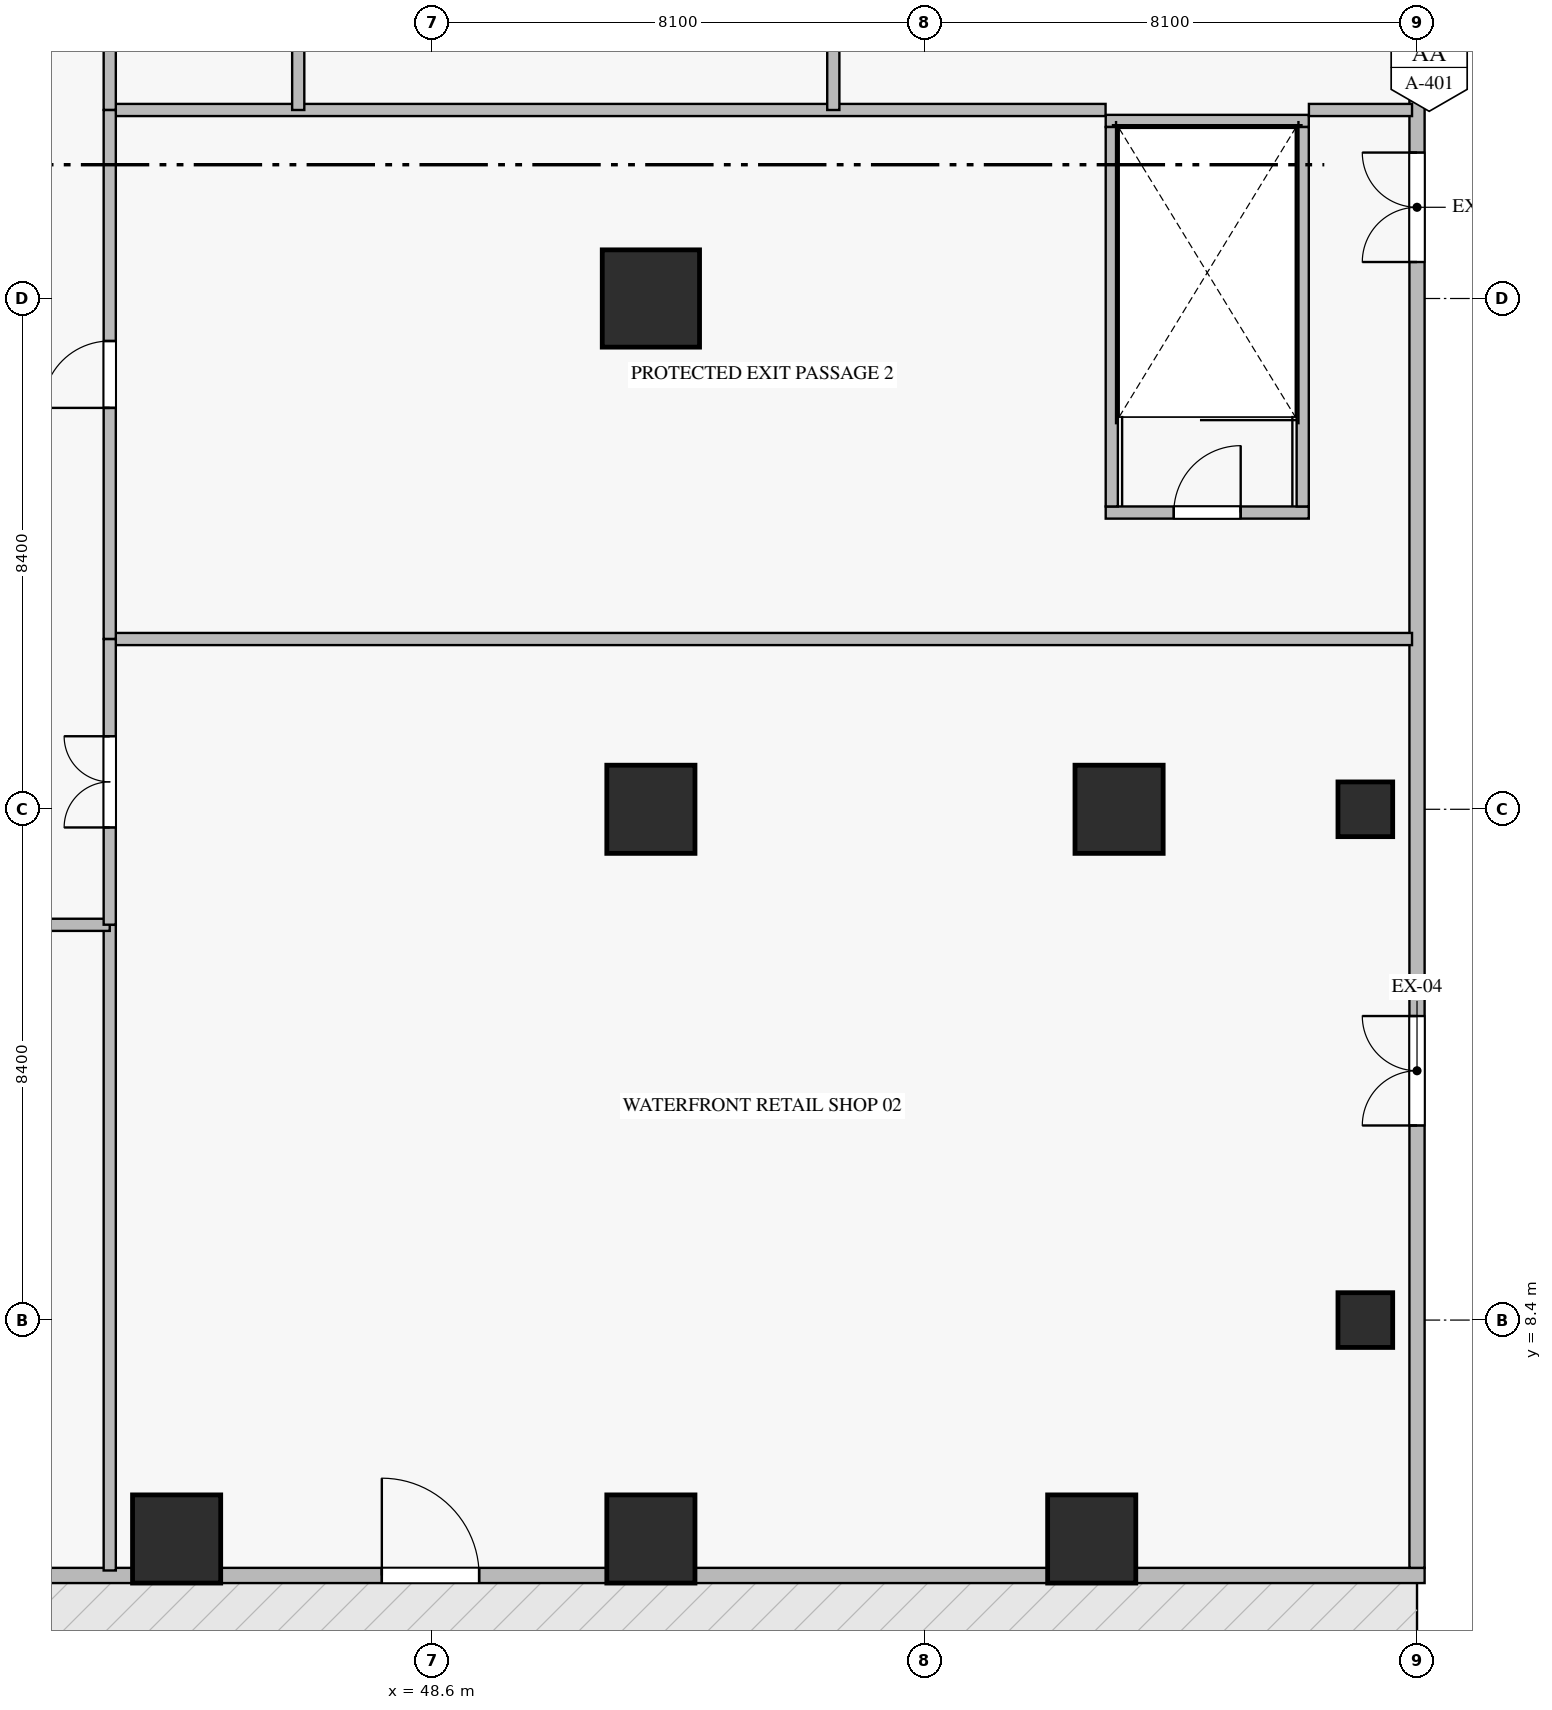
"""IFC4 building model, lengths in metres.
Left out: names, types, materials, properties, quantities, classifications, styles, units other than length and angle.
Written with IfcOpenShell. Run it as: python <this file> out.ifc"""

import sys

from ifc_helpers import new_model, si_unit, direction, frame, frame_2d, origin, origin_2d, place, context, subcontext, project, spatial, rectangle, extrude, source, transform, mapped, element, fill, save


model = new_model("IFC4")
c1 = context("Model", 3, precision=1e-05, world=origin(), true_north=direction((0.0, 1.0)))
c2 = subcontext(c1, "Body", "Model", "MODEL_VIEW")
j1 = project(units=[si_unit("LENGTHUNIT", "METRE"), si_unit("PLANEANGLEUNIT", "RADIAN")], contexts=[c1])
p1 = place(None, origin())
s1 = spatial("IfcSite", under=j1, at=p1, CompositionType="ELEMENT")
p2 = place(p1, origin())
s2 = spatial("IfcBuilding", under=s1, at=p2, CompositionType="ELEMENT")
p3 = place(p2, origin())
s3 = spatial("IfcBuildingStorey", under=s2, at=p3, CompositionType="ELEMENT", Elevation=0.0)
m1 = source(origin(), c2, "Body", "SweptSolid", [
    extrude(rectangle(XDim=0.9, YDim=0.9, at=origin_2d()), origin(), (0.0, 0.0, 1.0), 5.5),
])
for number, where, z_axis, x_axis in (
    (1, (63.95, 8.4, -0.38), (0.0, 0.0, 1.0), (1.0, 0.0, 0.0)),
    (2, (63.95, 16.8, -0.38), (0.0, 0.0, 1.0), (1.0, 0.0, 0.0)),
):
    element("IfcColumn", number, at=place(p3, frame(where, z_axis=z_axis, x_axis=x_axis)), inside=s3, PredefinedType="COLUMN", context=c2, shape_type="MappedRepresentation", body=[
        mapped(m1, transform((0.0, 0.0, 0.0), scale=1.0)),
    ])
m2 = source(origin(), c2, "Body", "SweptSolid", [
    extrude(rectangle(XDim=1.45, YDim=1.45, at=origin_2d()), origin(), (0.0, 0.0, 1.0), 5.5),
])
for number, where, z_axis, x_axis in (
    (3, (44.4, 4.8, -0.38), (0.0, 0.0, 1.0), (1.0, 0.0, 0.0)),
    (4, (52.2, 4.8, -0.38), (0.0, 0.0, 1.0), (1.0, 0.0, 0.0)),
    (5, (52.2, 16.8, -0.38), (0.0, 0.0, 1.0), (1.0, 0.0, 0.0)),
):
    element("IfcColumn", number, at=place(p3, frame(where, z_axis=z_axis, x_axis=x_axis)), inside=s3, PredefinedType="COLUMN", context=c2, shape_type="MappedRepresentation", body=[
        mapped(m2, transform((0.0, 0.0, 0.0), scale=1.0)),
    ])
m3 = source(origin(), c2, "Body", "SweptSolid", [
    extrude(rectangle(XDim=1.6, YDim=1.6, at=origin_2d()), origin(), (0.0, 0.0, 1.0), 5.5),
])
p4 = place(p3, frame((52.2, 25.2, -0.38), z_axis=(0.0, 0.0, 1.0), x_axis=(1.0, 0.0, 0.0)))
e6 = element("IfcColumn", 6, at=p4, inside=s3, PredefinedType="COLUMN", context=c2, shape_type="MappedRepresentation", body=[
    mapped(m3, transform((0.0, 0.0, 0.0), scale=1.0)),
])
for number, where, z_axis, x_axis in (
    (7, (59.9, 16.8, -0.38), (0.0, 0.0, 1.0), (1.0, 0.0, 0.0)),
    (8, (59.45, 4.8, -0.38), (0.0, 0.0, 1.0), (1.0, 0.0, 0.0)),
):
    element("IfcColumn", number, at=place(p3, frame(where, z_axis=z_axis, x_axis=x_axis)), inside=s3, PredefinedType="COLUMN", context=c2, shape_type="MappedRepresentation", body=[
        mapped(m2, transform((0.0, 0.0, 0.0), scale=1.0)),
    ])
p5 = place(p3, frame((40.375, 4.2, 0.0), z_axis=(0.0, 0.0, 1.0), x_axis=(1.0, 0.0, 0.0)))
e9 = element("IfcWall", 9, at=p5, inside=s3, PredefinedType="ELEMENTEDWALL", context=c2, shape_type="SweptSolid", body=[
    extrude(rectangle(XDim=24.55, YDim=0.25, at=frame_2d((12.275, 0.0))), origin(), (0.0, 0.0, 1.0), 5.105),
])
p6 = place(p5, frame((7.4, 0.0, 0.0)))
e10 = element("IfcOpeningElement", 10, at=p6, cuts=e9, PredefinedType="OPENING", context=c2, shape_type="SweptSolid", body=[
    extrude(rectangle(XDim=1.6, YDim=2.4, at=frame_2d((0.8, 1.2))), frame((0.0, 0.135, 0.0), z_axis=(0.0, -1.0, 0.0), x_axis=(1.0, 0.0, 0.0)), (0.0, 0.0, 1.0), 0.27),
])
p7 = place(p3, frame((64.8, 4.325, 0.0), z_axis=(0.0, 0.0, 1.0), x_axis=(0.0, 1.0, 0.0)))
e11 = element("IfcWall", 11, at=p7, inside=s3, PredefinedType="ELEMENTEDWALL", context=c2, shape_type="SweptSolid", body=[
    extrude(rectangle(XDim=41.75, YDim=0.25, at=frame_2d((20.875, 0.0))), origin(), (0.0, 0.0, 1.0), 5.105),
])
p8 = place(p7, frame((21.475, 0.0, 0.0)))
e12 = element("IfcOpeningElement", 12, at=p8, cuts=e11, PredefinedType="OPENING", context=c2, shape_type="SweptSolid", body=[
    extrude(rectangle(XDim=1.8, YDim=2.3, at=frame_2d((0.9, 1.15))), frame((0.0, 0.135, 0.0), z_axis=(0.0, -1.0, 0.0), x_axis=(1.0, 0.0, 0.0)), (0.0, 0.0, 1.0), 0.27),
])
p9 = place(p7, frame((7.275, 0.0, 0.0)))
e13 = element("IfcOpeningElement", 13, at=p9, cuts=e11, PredefinedType="OPENING", context=c2, shape_type="SweptSolid", body=[
    extrude(rectangle(XDim=1.8, YDim=2.3, at=frame_2d((0.9, 1.15))), frame((0.0, 0.135, 0.0), z_axis=(0.0, -1.0, 0.0), x_axis=(1.0, 0.0, 0.0)), (0.0, 0.0, 1.0), 0.27),
])
p10 = place(p3, frame((59.68, 21.68, 0.0), z_axis=(0.0, 0.0, 1.0), x_axis=(1.0, 0.0, 0.0)))
e14 = element("IfcWall", 14, at=p10, inside=s3, PredefinedType="STANDARD", context=c2, shape_type="SweptSolid", body=[
    extrude(rectangle(XDim=3.34, YDim=0.2, at=frame_2d((1.67, 0.0))), origin(), (0.0, 0.0, 1.0), 5.12),
])
p11 = place(p10, frame((1.12, 0.0, 0.0)))
e15 = element("IfcOpeningElement", 15, at=p11, cuts=e14, PredefinedType="OPENING", context=c2, shape_type="SweptSolid", body=[
    extrude(rectangle(XDim=1.1, YDim=2.15, at=frame_2d((0.55, 1.075))), frame((0.0, 0.11, 0.0), z_axis=(0.0, -1.0, 0.0), x_axis=(1.0, 0.0, 0.0)), (0.0, 0.0, 1.0), 0.22),
])
p12 = place(p3, frame((59.68, 28.12, 0.0), z_axis=(0.0, 0.0, 1.0), x_axis=(1.0, 0.0, 0.0)))
e16 = element("IfcWall", 16, at=p12, inside=s3, PredefinedType="STANDARD", context=c2, shape_type="SweptSolid", body=[
    extrude(rectangle(XDim=3.34, YDim=0.2, at=frame_2d((1.67, 0.0))), origin(), (0.0, 0.0, 1.0), 5.12),
])
for number, where, z_axis, x_axis in (
    (17, (59.78, 21.78, 0.0), (0.0, 0.0, 1.0), (0.0, 1.0, 0.0)),
    (18, (62.92, 21.78, 0.0), (0.0, 0.0, 1.0), (0.0, 1.0, 0.0)),
):
    element("IfcWall", number, at=place(p3, frame(where, z_axis=z_axis, x_axis=x_axis)), inside=s3, PredefinedType="STANDARD", context=c2, shape_type="SweptSolid", body=[
        extrude(rectangle(XDim=6.24, YDim=0.2, at=frame_2d((3.12, 0.0))), origin(), (0.0, 0.0, 1.0), 5.12),
    ])
p13 = place(p3, frame((43.3, 4.282, 0.0), z_axis=(0.0, 0.0, 1.0), x_axis=(0.0, 1.0, 0.0)))
e19 = element("IfcWall", 19, at=p13, inside=s3, PredefinedType="STANDARD", context=c2, shape_type="SweptSolid", body=[
    extrude(rectangle(XDim=10.618, YDim=0.2, at=frame_2d((5.309, 0.0))), origin(), (0.0, 0.0, 1.0), 5.12),
])
p14 = place(p3, frame((43.3, 19.6, 0.0), z_axis=(0.0, 0.0, 1.0), x_axis=(1.0, 0.0, 0.0)))
e20 = element("IfcWall", 20, at=p14, inside=s3, PredefinedType="STANDARD", context=c2, shape_type="SweptSolid", body=[
    extrude(rectangle(XDim=21.418, YDim=0.2, at=frame_2d((10.709, 0.0))), origin(), (0.0, 0.0, 1.0), 5.12),
])
p15 = place(p3, frame((43.3, 28.3, 0.0), z_axis=(0.0, 0.0, 1.0), x_axis=(1.0, 0.0, 0.0)))
e21 = element("IfcWall", 21, at=p15, inside=s3, PredefinedType="STANDARD", context=c2, shape_type="SweptSolid", body=[
    extrude(rectangle(XDim=16.378, YDim=0.2, at=frame_2d((8.189, 0.0))), origin(), (0.0, 0.0, 1.0), 5.12),
])
p16 = place(p3, frame((63.022, 28.3, 0.0), z_axis=(0.0, 0.0, 1.0), x_axis=(1.0, 0.0, 0.0)))
e22 = element("IfcWall", 22, at=p16, inside=s3, PredefinedType="STANDARD", context=c2, shape_type="SweptSolid", body=[
    extrude(rectangle(XDim=1.696, YDim=0.2, at=frame_2d((0.848, 0.0))), origin(), (0.0, 0.0, 1.0), 5.12),
])
p17 = place(p3, frame((21.5, 14.9, 0.0), z_axis=(0.0, 0.0, 1.0), x_axis=(1.0, 0.0, 0.0)))
e23 = element("IfcWall", 23, at=p17, inside=s3, PredefinedType="STANDARD", context=c2, shape_type="SweptSolid", body=[
    extrude(rectangle(XDim=21.8, YDim=0.2, at=frame_2d((10.9, 0.0))), origin(), (0.0, 0.0, 1.0), 5.12),
])
p18 = place(p17, frame((10.1, 0.0, 0.0)))
e24 = element("IfcOpeningElement", 24, at=p18, cuts=e23, PredefinedType="OPENING", context=c2, shape_type="SweptSolid", body=[
    extrude(rectangle(XDim=1.6, YDim=2.3, at=frame_2d((0.8, 1.15))), frame((0.0, 0.11, 0.0), z_axis=(0.0, -1.0, 0.0), x_axis=(1.0, 0.0, 0.0)), (0.0, 0.0, 1.0), 0.22),
])
p19 = place(p3, frame((43.3, 14.902, 0.0), z_axis=(0.0, 0.0, 1.0), x_axis=(0.0, 1.0, 0.0)))
e25 = element("IfcWall", 25, at=p19, inside=s3, PredefinedType="STANDARD", context=c2, shape_type="SweptSolid", body=[
    extrude(rectangle(XDim=4.698, YDim=0.2, at=frame_2d((2.349, 0.0))), origin(), (0.0, 0.0, 1.0), 5.12),
])
p20 = place(p19, frame((1.599, 0.0, 0.0)))
e26 = element("IfcOpeningElement", 26, at=p20, cuts=e25, PredefinedType="OPENING", context=c2, shape_type="SweptSolid", body=[
    extrude(rectangle(XDim=1.5, YDim=2.25, at=frame_2d((0.75, 1.125))), frame((0.0, 0.11, 0.0), z_axis=(0.0, -1.0, 0.0), x_axis=(1.0, 0.0, 0.0)), (0.0, 0.0, 1.0), 0.22),
])
p21 = place(p3, frame((43.3, 19.602, 0.0), z_axis=(0.0, 0.0, 1.0), x_axis=(0.0, 1.0, 0.0)))
e27 = element("IfcWall", 27, at=p21, inside=s3, PredefinedType="STANDARD", context=c2, shape_type="SweptSolid", body=[
    extrude(rectangle(XDim=8.698, YDim=0.2, at=frame_2d((4.349, 0.0))), origin(), (0.0, 0.0, 1.0), 5.12),
])
p22 = place(p21, frame((3.799, 0.0, 0.0)))
e28 = element("IfcOpeningElement", 28, at=p22, cuts=e27, PredefinedType="OPENING", context=c2, shape_type="SweptSolid", body=[
    extrude(rectangle(XDim=1.1, YDim=2.15, at=frame_2d((0.55, 1.075))), frame((0.0, 0.11, 0.0), z_axis=(0.0, -1.0, 0.0), x_axis=(1.0, 0.0, 0.0)), (0.0, 0.0, 1.0), 0.22),
])
p23 = place(p3, frame((43.3, 28.302, 0.0), z_axis=(0.0, 0.0, 1.0), x_axis=(0.0, 1.0, 0.0)))
e29 = element("IfcWall", 29, at=p23, inside=s3, PredefinedType="STANDARD", context=c2, shape_type="SweptSolid", body=[
    extrude(rectangle(XDim=7.198, YDim=0.2, at=frame_2d((3.599, 0.0))), origin(), (0.0, 0.0, 1.0), 5.12),
])
p24 = place(p23, frame((2.899, 0.0, 0.0)))
e30 = element("IfcOpeningElement", 30, at=p24, cuts=e29, PredefinedType="OPENING", context=c2, shape_type="SweptSolid", body=[
    extrude(rectangle(XDim=1.4, YDim=2.2, at=frame_2d((0.7, 1.1))), frame((0.0, 0.11, 0.0), z_axis=(0.0, -1.0, 0.0), x_axis=(1.0, 0.0, 0.0)), (0.0, 0.0, 1.0), 0.22),
])
p25 = place(p3, frame((46.4, 28.3, 0.0), z_axis=(0.0, 0.0, 1.0), x_axis=(0.0, 1.0, 0.0)))
e31 = element("IfcWall", 31, at=p25, inside=s3, PredefinedType="STANDARD", context=c2, shape_type="SweptSolid", body=[
    extrude(rectangle(XDim=17.9, YDim=0.2, at=frame_2d((8.95, 0.0))), origin(), (0.0, 0.0, 1.0), 5.12),
])
p26 = place(p25, frame((3.696, 0.0, 0.0)))
e32 = element("IfcOpeningElement", 32, at=p26, cuts=e31, PredefinedType="OPENING", context=c2, shape_type="SweptSolid", body=[
    extrude(rectangle(XDim=1.1, YDim=2.15, at=frame_2d((0.55, 1.075))), frame((0.0, 0.11, 0.0), z_axis=(0.0, -1.0, 0.0), x_axis=(1.0, 0.0, 0.0)), (0.0, 0.0, 1.0), 0.22),
])
p27 = place(p3, frame((55.2, 28.3, 0.0), z_axis=(0.0, 0.0, 1.0), x_axis=(0.0, 1.0, 0.0)))
e33 = element("IfcWall", 33, at=p27, inside=s3, PredefinedType="STANDARD", context=c2, shape_type="SweptSolid", body=[
    extrude(rectangle(XDim=19.618, YDim=0.2, at=frame_2d((9.809, 0.0))), origin(), (0.0, 0.0, 1.0), 5.12),
])
p28 = place(p27, frame((6.376, 0.0, 0.0)))
e34 = element("IfcOpeningElement", 34, at=p28, cuts=e33, PredefinedType="OPENING", context=c2, shape_type="SweptSolid", body=[
    extrude(rectangle(XDim=1.4, YDim=2.2, at=frame_2d((0.7, 1.1))), frame((0.0, 0.11, 0.0), z_axis=(0.0, -1.0, 0.0), x_axis=(1.0, 0.0, 0.0)), (0.0, 0.0, 1.0), 0.22),
])
m4 = source(origin(), c2, "Body", "SweptSolid", [
    extrude(rectangle(XDim=1.6, YDim=2.4, at=frame_2d((0.8, 1.2))), frame((0.0, 0.025, 0.0), z_axis=(0.0, -1.0, 0.0), x_axis=(1.0, 0.0, 0.0)), (0.0, 0.0, 1.0), 0.05),
])
p29 = place(p6, origin())
e35 = element("IfcDoor", 35, at=p29, inside=s3, OperationType="SINGLE_SWING_LEFT", PredefinedType="DOOR", context=c2, shape_type="MappedRepresentation", body=[
    mapped(m4, transform((0.0, 0.0, 0.0), scale=1.0)),
])
fill(e10, e35)
m5 = source(origin(), c2, "Body", "SweptSolid", [
    extrude(rectangle(XDim=1.8, YDim=2.3, at=frame_2d((0.9, 1.15))), frame((0.0, 0.025, 0.0), z_axis=(0.0, -1.0, 0.0), x_axis=(1.0, 0.0, 0.0)), (0.0, 0.0, 1.0), 0.05),
])
p30 = place(p8, frame((1.8, 0.0, 0.0), z_axis=(0.0, 0.0, 1.0), x_axis=(-1.0, 0.0, 0.0)))
e36 = element("IfcDoor", 36, at=p30, inside=s3, OperationType="DOUBLE_DOOR_SINGLE_SWING", PredefinedType="DOOR", context=c2, shape_type="MappedRepresentation", body=[
    mapped(m5, transform((0.0, 0.0, 0.0), scale=1.0)),
])
fill(e12, e36)
p31 = place(p9, frame((1.8, 0.0, 0.0), z_axis=(0.0, 0.0, 1.0), x_axis=(-1.0, 0.0, 0.0)))
e37 = element("IfcDoor", 37, at=p31, inside=s3, OperationType="DOUBLE_DOOR_SINGLE_SWING", PredefinedType="DOOR", context=c2, shape_type="MappedRepresentation", body=[
    mapped(m5, transform((0.0, 0.0, 0.0), scale=1.0)),
])
fill(e13, e37)
m6 = source(origin(), c2, "Body", "SweptSolid", [
    extrude(rectangle(XDim=1.1, YDim=2.15, at=frame_2d((0.55, 1.075))), frame((0.0, 0.025, 0.0), z_axis=(0.0, -1.0, 0.0), x_axis=(1.0, 0.0, 0.0)), (0.0, 0.0, 1.0), 0.05),
])
p32 = place(p11, origin())
e38 = element("IfcDoor", 38, at=p32, inside=s3, OperationType="SINGLE_SWING_RIGHT", PredefinedType="DOOR", context=c2, shape_type="MappedRepresentation", body=[
    mapped(m6, transform((0.0, 0.0, 0.0), scale=1.0)),
])
fill(e15, e38)
m7 = source(origin(), c2, "Body", "SweptSolid", [
    extrude(rectangle(XDim=1.5, YDim=2.25, at=frame_2d((0.75, 1.125))), frame((0.0, 0.025, 0.0), z_axis=(0.0, -1.0, 0.0), x_axis=(1.0, 0.0, 0.0)), (0.0, 0.0, 1.0), 0.05),
])
p33 = place(p20, origin())
e39 = element("IfcDoor", 39, at=p33, inside=s3, OperationType="DOUBLE_DOOR_SINGLE_SWING", PredefinedType="DOOR", context=c2, shape_type="MappedRepresentation", body=[
    mapped(m7, transform((0.0, 0.0, 0.0), scale=1.0)),
])
fill(e26, e39)
p34 = place(p22, origin())
e40 = element("IfcDoor", 40, at=p34, inside=s3, OperationType="SINGLE_SWING_LEFT", PredefinedType="DOOR", context=c2, shape_type="MappedRepresentation", body=[
    mapped(m6, transform((0.0, 0.0, 0.0), scale=1.0)),
])
fill(e28, e40)
save(model, sys.argv[1])
